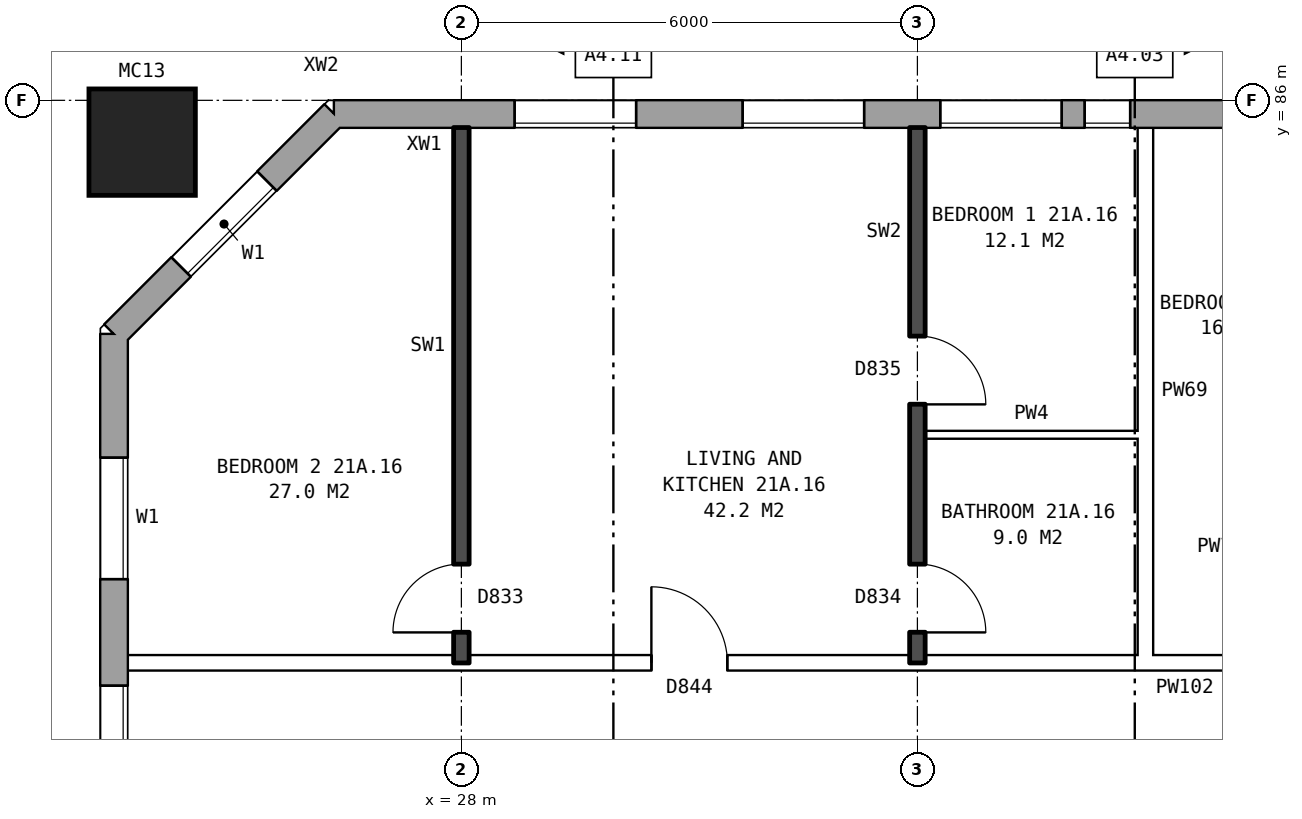
"""IFC4 building model, lengths in metres.
Left out: names, types, materials, properties, quantities, classifications, styles, units other than length and angle.
Written with IfcOpenShell. Run it as: python <this file> out.ifc"""

import sys

from ifc_helpers import new_model, si_unit, direction, frame, frame_2d, origin, origin_2d, place, context, subcontext, project, spatial, rectangle, hollow_rectangle, extrude, element, fill, save


model = new_model("IFC4")
c1 = context("Model", 3, precision=1e-05, world=origin(), true_north=direction((0.0, 1.0)))
c2 = subcontext(c1, "Body", "Model", "MODEL_VIEW")
j1 = project(units=[si_unit("LENGTHUNIT", "METRE"), si_unit("PLANEANGLEUNIT", "RADIAN")], contexts=[c1])
p1 = place(None, origin())
s1 = spatial("IfcSite", under=j1, at=p1, CompositionType="ELEMENT")
p2 = place(p1, origin())
s2 = spatial("IfcBuilding", under=s1, at=p2, CompositionType="ELEMENT")
p3 = place(p2, frame((0.0, 0.0, 77.8)))
s3 = spatial("IfcBuildingStorey", under=s2, at=p3, CompositionType="ELEMENT", Elevation=77.8)
p4 = place(p3, frame((23.8, 85.45, 0.0), z_axis=(0.0, 0.0, 1.0), x_axis=(1.0, 0.0, 0.0)))
e1 = element("IfcColumn", 1, at=p4, inside=s3, PredefinedType="COLUMN", context=c2, shape_type="SweptSolid", body=[
    extrude(hollow_rectangle(XDim=1.4, YDim=1.4, WallThickness=0.075, at=origin_2d()), origin(), (0.0, 0.0, 1.0), 3.1),
])
p5 = place(p3, frame((72.925, 85.82, 0.0), z_axis=(0.0, 0.0, 1.0), x_axis=(-1.0, 0.0, 0.0)))
e2 = element("IfcWall", 2, at=p5, inside=s3, PredefinedType="STANDARD", context=c2, shape_type="SweptSolid", body=[
    extrude(rectangle(XDim=46.601, YDim=0.36, at=frame_2d((23.3, 0.0))), origin(), (0.0, 0.0, 1.0), 2.85),
])
p6 = place(p5, frame((0.625, 0.0, 0.8)))
e3 = element("IfcOpeningElement", 3, at=p6, cuts=e2, PredefinedType="OPENING", context=c2, shape_type="SweptSolid", body=[
    extrude(rectangle(XDim=1.6, YDim=1.8, at=frame_2d((0.8, 0.9))), frame((0.0, 0.19, 0.0), z_axis=(0.0, -1.0, 0.0), x_axis=(1.0, 0.0, 0.0)), (0.0, 0.0, 1.0), 0.38),
])
p7 = place(p5, frame((3.625, 0.0, 0.8)))
e4 = element("IfcOpeningElement", 4, at=p7, cuts=e2, PredefinedType="OPENING", context=c2, shape_type="SweptSolid", body=[
    extrude(rectangle(XDim=1.6, YDim=1.8, at=frame_2d((0.8, 0.9))), frame((0.0, 0.19, 0.0), z_axis=(0.0, -1.0, 0.0), x_axis=(1.0, 0.0, 0.0)), (0.0, 0.0, 1.0), 0.38),
])
p8 = place(p5, frame((6.625, 0.0, 0.8)))
e5 = element("IfcOpeningElement", 5, at=p8, cuts=e2, PredefinedType="OPENING", context=c2, shape_type="SweptSolid", body=[
    extrude(rectangle(XDim=1.6, YDim=1.8, at=frame_2d((0.8, 0.9))), frame((0.0, 0.19, 0.0), z_axis=(0.0, -1.0, 0.0), x_axis=(1.0, 0.0, 0.0)), (0.0, 0.0, 1.0), 0.38),
])
p9 = place(p5, frame((9.125, 0.0, 1.65)))
e6 = element("IfcOpeningElement", 6, at=p9, cuts=e2, PredefinedType="OPENING", context=c2, shape_type="SweptSolid", body=[
    extrude(rectangle(XDim=1.4, YDim=0.9, at=frame_2d((0.7, 0.45))), frame((0.0, 0.19, 0.0), z_axis=(0.0, -1.0, 0.0), x_axis=(1.0, 0.0, 0.0)), (0.0, 0.0, 1.0), 0.38),
])
p10 = place(p5, frame((12.625, 0.0, 0.8)))
e7 = element("IfcOpeningElement", 7, at=p10, cuts=e2, PredefinedType="OPENING", context=c2, shape_type="SweptSolid", body=[
    extrude(rectangle(XDim=1.6, YDim=1.8, at=frame_2d((0.8, 0.9))), frame((0.0, 0.19, 0.0), z_axis=(0.0, -1.0, 0.0), x_axis=(1.0, 0.0, 0.0)), (0.0, 0.0, 1.0), 0.38),
])
p11 = place(p5, frame((15.625, 0.0, 0.8)))
e8 = element("IfcOpeningElement", 8, at=p11, cuts=e2, PredefinedType="OPENING", context=c2, shape_type="SweptSolid", body=[
    extrude(rectangle(XDim=1.6, YDim=1.8, at=frame_2d((0.8, 0.9))), frame((0.0, 0.19, 0.0), z_axis=(0.0, -1.0, 0.0), x_axis=(1.0, 0.0, 0.0)), (0.0, 0.0, 1.0), 0.38),
])
p12 = place(p5, frame((18.625, 0.0, 0.8)))
e9 = element("IfcOpeningElement", 9, at=p12, cuts=e2, PredefinedType="OPENING", context=c2, shape_type="SweptSolid", body=[
    extrude(rectangle(XDim=1.6, YDim=1.8, at=frame_2d((0.8, 0.9))), frame((0.0, 0.19, 0.0), z_axis=(0.0, -1.0, 0.0), x_axis=(1.0, 0.0, 0.0)), (0.0, 0.0, 1.0), 0.38),
])
p13 = place(p5, frame((21.625, 0.0, 0.8)))
e10 = element("IfcOpeningElement", 10, at=p13, cuts=e2, PredefinedType="OPENING", context=c2, shape_type="SweptSolid", body=[
    extrude(rectangle(XDim=1.6, YDim=1.8, at=frame_2d((0.8, 0.9))), frame((0.0, 0.19, 0.0), z_axis=(0.0, -1.0, 0.0), x_axis=(1.0, 0.0, 0.0)), (0.0, 0.0, 1.0), 0.38),
])
p14 = place(p5, frame((24.625, 0.0, 0.8)))
e11 = element("IfcOpeningElement", 11, at=p14, cuts=e2, PredefinedType="OPENING", context=c2, shape_type="SweptSolid", body=[
    extrude(rectangle(XDim=1.6, YDim=1.8, at=frame_2d((0.8, 0.9))), frame((0.0, 0.19, 0.0), z_axis=(0.0, -1.0, 0.0), x_axis=(1.0, 0.0, 0.0)), (0.0, 0.0, 1.0), 0.38),
])
p15 = place(p5, frame((27.625, 0.0, 0.8)))
e12 = element("IfcOpeningElement", 12, at=p15, cuts=e2, PredefinedType="OPENING", context=c2, shape_type="SweptSolid", body=[
    extrude(rectangle(XDim=1.6, YDim=1.8, at=frame_2d((0.8, 0.9))), frame((0.0, 0.19, 0.0), z_axis=(0.0, -1.0, 0.0), x_axis=(1.0, 0.0, 0.0)), (0.0, 0.0, 1.0), 0.38),
])
p16 = place(p5, frame((30.625, 0.0, 0.8)))
e13 = element("IfcOpeningElement", 13, at=p16, cuts=e2, PredefinedType="OPENING", context=c2, shape_type="SweptSolid", body=[
    extrude(rectangle(XDim=1.6, YDim=1.8, at=frame_2d((0.8, 0.9))), frame((0.0, 0.19, 0.0), z_axis=(0.0, -1.0, 0.0), x_axis=(1.0, 0.0, 0.0)), (0.0, 0.0, 1.0), 0.38),
])
p17 = place(p5, frame((33.125, 0.0, 0.75)))
e14 = element("IfcOpeningElement", 14, at=p17, cuts=e2, PredefinedType="OPENING", context=c2, shape_type="SweptSolid", body=[
    extrude(rectangle(XDim=0.6, YDim=1.8, at=frame_2d((0.3, 0.9))), frame((0.0, 0.19, 0.0), z_axis=(0.0, -1.0, 0.0), x_axis=(1.0, 0.0, 0.0)), (0.0, 0.0, 1.0), 0.38),
])
p18 = place(p5, frame((36.125, 0.0, 1.6)))
e15 = element("IfcOpeningElement", 15, at=p18, cuts=e2, PredefinedType="OPENING", context=c2, shape_type="SweptSolid", body=[
    extrude(rectangle(XDim=0.6, YDim=0.9, at=frame_2d((0.3, 0.45))), frame((0.0, 0.19, 0.0), z_axis=(0.0, -1.0, 0.0), x_axis=(1.0, 0.0, 0.0)), (0.0, 0.0, 1.0), 0.38),
])
p19 = place(p5, frame((39.625, 0.0, 0.8)))
e16 = element("IfcOpeningElement", 16, at=p19, cuts=e2, PredefinedType="OPENING", context=c2, shape_type="SweptSolid", body=[
    extrude(rectangle(XDim=1.6, YDim=1.8, at=frame_2d((0.8, 0.9))), frame((0.0, 0.19, 0.0), z_axis=(0.0, -1.0, 0.0), x_axis=(1.0, 0.0, 0.0)), (0.0, 0.0, 1.0), 0.38),
])
p20 = place(p5, frame((42.625, 0.0, 0.8)))
e17 = element("IfcOpeningElement", 17, at=p20, cuts=e2, PredefinedType="OPENING", context=c2, shape_type="SweptSolid", body=[
    extrude(rectangle(XDim=1.6, YDim=1.8, at=frame_2d((0.8, 0.9))), frame((0.0, 0.19, 0.0), z_axis=(0.0, -1.0, 0.0), x_axis=(1.0, 0.0, 0.0)), (0.0, 0.0, 1.0), 0.38),
])
p21 = place(p5, frame((11.125, 0.0, 0.15)))
e18 = element("IfcOpeningElement", 18, at=p21, cuts=e2, PredefinedType="OPENING", context=c2, shape_type="SweptSolid", body=[
    extrude(rectangle(XDim=0.6, YDim=0.9, at=frame_2d((0.3, 0.45))), frame((0.0, 0.19, 0.0), z_axis=(0.0, -1.0, 0.0), x_axis=(1.0, 0.0, 0.0)), (0.0, 0.0, 1.0), 0.38),
])
p22 = place(p5, frame((34.025, 0.0, 0.65)))
e19 = element("IfcOpeningElement", 19, at=p22, cuts=e2, PredefinedType="OPENING", context=c2, shape_type="SweptSolid", body=[
    extrude(rectangle(XDim=0.8, YDim=0.9, at=frame_2d((0.4, 0.45))), frame((0.0, 0.19, 0.0), z_axis=(0.0, -1.0, 0.0), x_axis=(1.0, 0.0, 0.0)), (0.0, 0.0, 1.0), 0.38),
])
p23 = place(p5, frame((37.025, 0.0, 0.8)))
e20 = element("IfcOpeningElement", 20, at=p23, cuts=e2, PredefinedType="OPENING", context=c2, shape_type="SweptSolid", body=[
    extrude(rectangle(XDim=1.6, YDim=1.8, at=frame_2d((0.8, 0.9))), frame((0.0, 0.19, 0.0), z_axis=(0.0, -1.0, 0.0), x_axis=(1.0, 0.0, 0.0)), (0.0, 0.0, 1.0), 0.38),
])
p24 = place(p3, frame((26.325, 85.82, 0.0), z_axis=(0.0, 0.0, 1.0), x_axis=(-0.707106781187, -0.707106781187, 0.0)))
e21 = element("IfcWall", 21, at=p24, inside=s3, PredefinedType="STANDARD", context=c2, shape_type="SweptSolid", body=[
    extrude(rectangle(XDim=4.094, YDim=0.36, at=frame_2d((2.047, 0.0))), origin(), (0.0, 0.0, 1.0), 2.85),
])
p25 = place(p24, frame((1.247, 0.0, 0.8)))
e22 = element("IfcOpeningElement", 22, at=p25, cuts=e21, PredefinedType="OPENING", context=c2, shape_type="SweptSolid", body=[
    extrude(rectangle(XDim=1.6, YDim=1.8, at=frame_2d((0.8, 0.9))), frame((0.0, 0.19, 0.0), z_axis=(0.0, -1.0, 0.0), x_axis=(1.0, 0.0, 0.0)), (0.0, 0.0, 1.0), 0.38),
])
p26 = place(p3, frame((23.43, 82.925, 0.0), z_axis=(0.0, 0.0, 1.0), x_axis=(0.0, -1.0, 0.0)))
e23 = element("IfcWall", 23, at=p26, inside=s3, PredefinedType="STANDARD", context=c2, shape_type="SweptSolid", body=[
    extrude(rectangle(XDim=25.851, YDim=0.36, at=frame_2d((12.925, 0.0))), origin(), (0.0, 0.0, 1.0), 2.85),
])
p27 = place(p26, frame((1.625, 0.0, 0.8)))
e24 = element("IfcOpeningElement", 24, at=p27, cuts=e23, PredefinedType="OPENING", context=c2, shape_type="SweptSolid", body=[
    extrude(rectangle(XDim=1.6, YDim=1.8, at=frame_2d((0.8, 0.9))), frame((0.0, 0.19, 0.0), z_axis=(0.0, -1.0, 0.0), x_axis=(1.0, 0.0, 0.0)), (0.0, 0.0, 1.0), 0.38),
])
p28 = place(p26, frame((4.625, 0.0, 0.8)))
e25 = element("IfcOpeningElement", 25, at=p28, cuts=e23, PredefinedType="OPENING", context=c2, shape_type="SweptSolid", body=[
    extrude(rectangle(XDim=1.6, YDim=1.8, at=frame_2d((0.8, 0.9))), frame((0.0, 0.19, 0.0), z_axis=(0.0, -1.0, 0.0), x_axis=(1.0, 0.0, 0.0)), (0.0, 0.0, 1.0), 0.38),
])
p29 = place(p26, frame((7.625, 0.0, 0.8)))
e26 = element("IfcOpeningElement", 26, at=p29, cuts=e23, PredefinedType="OPENING", context=c2, shape_type="SweptSolid", body=[
    extrude(rectangle(XDim=1.6, YDim=1.8, at=frame_2d((0.8, 0.9))), frame((0.0, 0.19, 0.0), z_axis=(0.0, -1.0, 0.0), x_axis=(1.0, 0.0, 0.0)), (0.0, 0.0, 1.0), 0.38),
])
p30 = place(p26, frame((6.525, 0.0, 0.8)))
e27 = element("IfcOpeningElement", 27, at=p30, cuts=e23, PredefinedType="OPENING", context=c2, shape_type="SweptSolid", body=[
    extrude(rectangle(XDim=0.8, YDim=1.8, at=frame_2d((0.4, 0.9))), frame((0.0, 0.19, 0.0), z_axis=(0.0, -1.0, 0.0), x_axis=(1.0, 0.0, 0.0)), (0.0, 0.0, 1.0), 0.38),
])
p31 = place(p26, frame((9.525, 0.0, 0.8)))
e28 = element("IfcOpeningElement", 28, at=p31, cuts=e23, PredefinedType="OPENING", context=c2, shape_type="SweptSolid", body=[
    extrude(rectangle(XDim=1.4, YDim=1.2, at=frame_2d((0.7, 0.6))), frame((0.0, 0.19, 0.0), z_axis=(0.0, -1.0, 0.0), x_axis=(1.0, 0.0, 0.0)), (0.0, 0.0, 1.0), 0.38),
])
p32 = place(p26, frame((16.625, 0.0, 0.8)))
e29 = element("IfcOpeningElement", 29, at=p32, cuts=e23, PredefinedType="OPENING", context=c2, shape_type="SweptSolid", body=[
    extrude(rectangle(XDim=1.6, YDim=1.8, at=frame_2d((0.8, 0.9))), frame((0.0, 0.19, 0.0), z_axis=(0.0, -1.0, 0.0), x_axis=(1.0, 0.0, 0.0)), (0.0, 0.0, 1.0), 0.38),
])
p33 = place(p26, frame((19.625, 0.0, 0.8)))
e30 = element("IfcOpeningElement", 30, at=p33, cuts=e23, PredefinedType="OPENING", context=c2, shape_type="SweptSolid", body=[
    extrude(rectangle(XDim=1.6, YDim=1.8, at=frame_2d((0.8, 0.9))), frame((0.0, 0.19, 0.0), z_axis=(0.0, -1.0, 0.0), x_axis=(1.0, 0.0, 0.0)), (0.0, 0.0, 1.0), 0.38),
])
p34 = place(p26, frame((22.625, 0.0, 0.8)))
e31 = element("IfcOpeningElement", 31, at=p34, cuts=e23, PredefinedType="OPENING", context=c2, shape_type="SweptSolid", body=[
    extrude(rectangle(XDim=1.6, YDim=1.8, at=frame_2d((0.8, 0.9))), frame((0.0, 0.19, 0.0), z_axis=(0.0, -1.0, 0.0), x_axis=(1.0, 0.0, 0.0)), (0.0, 0.0, 1.0), 0.38),
])
p35 = place(p26, frame((12.275, 0.0, 0.8)))
e32 = element("IfcOpeningElement", 32, at=p35, cuts=e23, PredefinedType="OPENING", context=c2, shape_type="SweptSolid", body=[
    extrude(rectangle(XDim=1.2, YDim=1.8, at=frame_2d((0.6, 0.9))), frame((0.0, 0.19, 0.0), z_axis=(0.0, -1.0, 0.0), x_axis=(1.0, 0.0, 0.0)), (0.0, 0.0, 1.0), 0.38),
])
p36 = place(p26, frame((14.475, 0.0, 0.8)))
e33 = element("IfcOpeningElement", 33, at=p36, cuts=e23, PredefinedType="OPENING", context=c2, shape_type="SweptSolid", body=[
    extrude(rectangle(XDim=1.2, YDim=0.9, at=frame_2d((0.6, 0.45))), frame((0.0, 0.19, 0.0), z_axis=(0.0, -1.0, 0.0), x_axis=(1.0, 0.0, 0.0)), (0.0, 0.0, 1.0), 0.38),
])
p37 = place(p26, frame((18.525, 0.0, 0.8)))
e34 = element("IfcOpeningElement", 34, at=p37, cuts=e23, PredefinedType="OPENING", context=c2, shape_type="SweptSolid", body=[
    extrude(rectangle(XDim=0.6, YDim=1.8, at=frame_2d((0.3, 0.9))), frame((0.0, 0.19, 0.0), z_axis=(0.0, -1.0, 0.0), x_axis=(1.0, 0.0, 0.0)), (0.0, 0.0, 1.0), 0.38),
])
p38 = place(p3, frame((23.61, 78.6, 0.0), z_axis=(0.0, 0.0, 1.0), x_axis=(1.0, 0.0, 0.0)))
e35 = element("IfcWall", 35, at=p38, inside=s3, PredefinedType="PARTITIONING", context=c2, shape_type="SweptSolid", body=[
    extrude(rectangle(XDim=22.29, YDim=0.2, at=frame_2d((11.145, 0.0))), origin(), (0.0, 0.0, 1.0), 2.85),
])
p39 = place(p38, frame((18.84, 0.0, 0.0)))
e36 = element("IfcOpeningElement", 36, at=p39, cuts=e35, PredefinedType="OPENING", context=c2, shape_type="SweptSolid", body=[
    extrude(rectangle(XDim=1.0, YDim=2.1, at=frame_2d((0.5, 1.05))), frame((0.0, 0.11, 0.0), z_axis=(0.0, -1.0, 0.0), x_axis=(1.0, 0.0, 0.0)), (0.0, 0.0, 1.0), 0.22),
])
p40 = place(p38, frame((6.89, 0.0, 0.0)))
e37 = element("IfcOpeningElement", 37, at=p40, cuts=e35, PredefinedType="OPENING", context=c2, shape_type="SweptSolid", body=[
    extrude(rectangle(XDim=1.0, YDim=2.1, at=frame_2d((0.5, 1.05))), frame((0.0, 0.11, 0.0), z_axis=(0.0, -1.0, 0.0), x_axis=(1.0, 0.0, 0.0)), (0.0, 0.0, 1.0), 0.22),
])
p41 = place(p3, frame((34.1, 81.6, 0.0), z_axis=(0.0, 0.0, 1.0), x_axis=(1.0, 0.0, 0.0)))
e38 = element("IfcWall", 38, at=p41, inside=s3, PredefinedType="PARTITIONING", context=c2, shape_type="SweptSolid", body=[
    extrude(rectangle(XDim=2.8, YDim=0.1, at=frame_2d((1.4, 0.0))), origin(), (0.0, 0.0, 1.0), 2.85),
])
p42 = place(p3, frame((28.0, 78.6, 0.0), z_axis=(0.0, 0.0, 1.0), x_axis=(0.0, 1.0, 0.0)))
e39 = element("IfcWall", 39, at=p42, inside=s3, PredefinedType="SOLIDWALL", context=c2, shape_type="SweptSolid", body=[
    extrude(rectangle(XDim=7.04, YDim=0.2, at=frame_2d((3.52, 0.0))), origin(), (0.0, 0.0, 1.0), 2.85),
])
p43 = place(p42, frame((0.4, 0.0, 0.0)))
e40 = element("IfcOpeningElement", 40, at=p43, cuts=e39, PredefinedType="OPENING", context=c2, shape_type="SweptSolid", body=[
    extrude(rectangle(XDim=0.9, YDim=2.1, at=frame_2d((0.45, 1.05))), frame((0.0, 0.11, 0.0), z_axis=(0.0, -1.0, 0.0), x_axis=(1.0, 0.0, 0.0)), (0.0, 0.0, 1.0), 0.22),
])
p44 = place(p3, frame((34.0, 78.6, 0.0), z_axis=(0.0, 0.0, 1.0), x_axis=(0.0, 1.0, 0.0)))
e41 = element("IfcWall", 41, at=p44, inside=s3, PredefinedType="SOLIDWALL", context=c2, shape_type="SweptSolid", body=[
    extrude(rectangle(XDim=7.04, YDim=0.2, at=frame_2d((3.52, 0.0))), origin(), (0.0, 0.0, 1.0), 2.85),
])
p45 = place(p44, frame((3.4, 0.0, 0.0)))
e42 = element("IfcOpeningElement", 42, at=p45, cuts=e41, PredefinedType="OPENING", context=c2, shape_type="SweptSolid", body=[
    extrude(rectangle(XDim=0.9, YDim=2.1, at=frame_2d((0.45, 1.05))), frame((0.0, 0.11, 0.0), z_axis=(0.0, -1.0, 0.0), x_axis=(1.0, 0.0, 0.0)), (0.0, 0.0, 1.0), 0.22),
])
p46 = place(p44, frame((0.4, 0.0, 0.0)))
e43 = element("IfcOpeningElement", 43, at=p46, cuts=e41, PredefinedType="OPENING", context=c2, shape_type="SweptSolid", body=[
    extrude(rectangle(XDim=0.9, YDim=2.1, at=frame_2d((0.45, 1.05))), frame((0.0, 0.11, 0.0), z_axis=(0.0, -1.0, 0.0), x_axis=(1.0, 0.0, 0.0)), (0.0, 0.0, 1.0), 0.22),
])
p47 = place(p3, frame((37.0, 78.7, 0.0), z_axis=(0.0, 0.0, 1.0), x_axis=(0.0, 1.0, 0.0)))
e44 = element("IfcWall", 44, at=p47, inside=s3, PredefinedType="PARTITIONING", context=c2, shape_type="SweptSolid", body=[
    extrude(rectangle(XDim=6.94, YDim=0.2, at=frame_2d((3.47, 0.0))), origin(), (0.0, 0.0, 1.0), 2.85),
])
p48 = place(p18, origin())
e45 = element("IfcWindow", 45, at=p48, inside=s3, PartitioningType="SINGLE_PANEL", PredefinedType="WINDOW", context=c2, shape_type="SweptSolid", body=[
    extrude(rectangle(XDim=0.6, YDim=0.9, at=frame_2d((0.3, 0.45))), frame((0.0, 0.15, 0.0), z_axis=(0.0, -1.0, 0.0), x_axis=(1.0, 0.0, 0.0)), (0.0, 0.0, 1.0), 0.06),
])
fill(e15, e45)
p49 = place(p19, origin())
e46 = element("IfcWindow", 46, at=p49, inside=s3, PartitioningType="SINGLE_PANEL", PredefinedType="WINDOW", context=c2, shape_type="SweptSolid", body=[
    extrude(rectangle(XDim=1.6, YDim=1.8, at=frame_2d((0.8, 0.9))), frame((0.0, 0.15, 0.0), z_axis=(0.0, -1.0, 0.0), x_axis=(1.0, 0.0, 0.0)), (0.0, 0.0, 1.0), 0.06),
])
fill(e16, e46)
p50 = place(p20, origin())
e47 = element("IfcWindow", 47, at=p50, inside=s3, PartitioningType="SINGLE_PANEL", PredefinedType="WINDOW", context=c2, shape_type="SweptSolid", body=[
    extrude(rectangle(XDim=1.6, YDim=1.8, at=frame_2d((0.8, 0.9))), frame((0.0, 0.15, 0.0), z_axis=(0.0, -1.0, 0.0), x_axis=(1.0, 0.0, 0.0)), (0.0, 0.0, 1.0), 0.06),
])
fill(e17, e47)
p51 = place(p25, origin())
e48 = element("IfcWindow", 48, at=p51, inside=s3, PartitioningType="SINGLE_PANEL", PredefinedType="WINDOW", context=c2, shape_type="SweptSolid", body=[
    extrude(rectangle(XDim=1.6, YDim=1.8, at=frame_2d((0.8, 0.9))), frame((0.0, 0.15, 0.0), z_axis=(0.0, -1.0, 0.0), x_axis=(1.0, 0.0, 0.0)), (0.0, 0.0, 1.0), 0.06),
])
fill(e22, e48)
p52 = place(p27, origin())
e49 = element("IfcWindow", 49, at=p52, inside=s3, PartitioningType="SINGLE_PANEL", PredefinedType="WINDOW", context=c2, shape_type="SweptSolid", body=[
    extrude(rectangle(XDim=1.6, YDim=1.8, at=frame_2d((0.8, 0.9))), frame((0.0, 0.15, 0.0), z_axis=(0.0, -1.0, 0.0), x_axis=(1.0, 0.0, 0.0)), (0.0, 0.0, 1.0), 0.06),
])
fill(e24, e49)
p53 = place(p28, origin())
e50 = element("IfcWindow", 50, at=p53, inside=s3, PartitioningType="SINGLE_PANEL", PredefinedType="WINDOW", context=c2, shape_type="SweptSolid", body=[
    extrude(rectangle(XDim=1.6, YDim=1.8, at=frame_2d((0.8, 0.9))), frame((0.0, 0.15, 0.0), z_axis=(0.0, -1.0, 0.0), x_axis=(1.0, 0.0, 0.0)), (0.0, 0.0, 1.0), 0.06),
])
fill(e25, e50)
p54 = place(p45, frame((0.9, 0.0, 0.0), z_axis=(0.0, 0.0, 1.0), x_axis=(-1.0, 0.0, 0.0)))
e51 = element("IfcDoor", 51, at=p54, inside=s3, OperationType="SINGLE_SWING_RIGHT", PredefinedType="DOOR", context=c2, shape_type="SweptSolid", body=[
    extrude(rectangle(XDim=0.9, YDim=2.1, at=frame_2d((0.45, 1.05))), frame((0.0, 0.025, 0.0), z_axis=(0.0, -1.0, 0.0), x_axis=(1.0, 0.0, 0.0)), (0.0, 0.0, 1.0), 0.05),
])
fill(e42, e51)
p55 = place(p43, origin())
e52 = element("IfcDoor", 52, at=p55, inside=s3, OperationType="SINGLE_SWING_LEFT", PredefinedType="DOOR", context=c2, shape_type="SweptSolid", body=[
    extrude(rectangle(XDim=0.9, YDim=2.1, at=frame_2d((0.45, 1.05))), frame((0.0, 0.025, 0.0), z_axis=(0.0, -1.0, 0.0), x_axis=(1.0, 0.0, 0.0)), (0.0, 0.0, 1.0), 0.05),
])
fill(e40, e52)
p56 = place(p40, origin())
e53 = element("IfcDoor", 53, at=p56, inside=s3, OperationType="SINGLE_SWING_LEFT", PredefinedType="DOOR", context=c2, shape_type="SweptSolid", body=[
    extrude(rectangle(XDim=1.0, YDim=2.1, at=frame_2d((0.5, 1.05))), frame((0.0, 0.025, 0.0), z_axis=(0.0, -1.0, 0.0), x_axis=(1.0, 0.0, 0.0)), (0.0, 0.0, 1.0), 0.05),
])
fill(e37, e53)
p57 = place(p46, frame((0.9, 0.0, 0.0), z_axis=(0.0, 0.0, 1.0), x_axis=(-1.0, 0.0, 0.0)))
e54 = element("IfcDoor", 54, at=p57, inside=s3, OperationType="SINGLE_SWING_RIGHT", PredefinedType="DOOR", context=c2, shape_type="SweptSolid", body=[
    extrude(rectangle(XDim=0.9, YDim=2.1, at=frame_2d((0.45, 1.05))), frame((0.0, 0.025, 0.0), z_axis=(0.0, -1.0, 0.0), x_axis=(1.0, 0.0, 0.0)), (0.0, 0.0, 1.0), 0.05),
])
fill(e43, e54)
p58 = place(p23, origin())
e55 = element("IfcWindow", 55, at=p58, inside=s3, PartitioningType="SINGLE_PANEL", PredefinedType="WINDOW", context=c2, shape_type="SweptSolid", body=[
    extrude(rectangle(XDim=1.6, YDim=1.8, at=frame_2d((0.8, 0.9))), frame((0.0, 0.15, 0.0), z_axis=(0.0, -1.0, 0.0), x_axis=(1.0, 0.0, 0.0)), (0.0, 0.0, 1.0), 0.06),
])
fill(e20, e55)
save(model, sys.argv[1])
